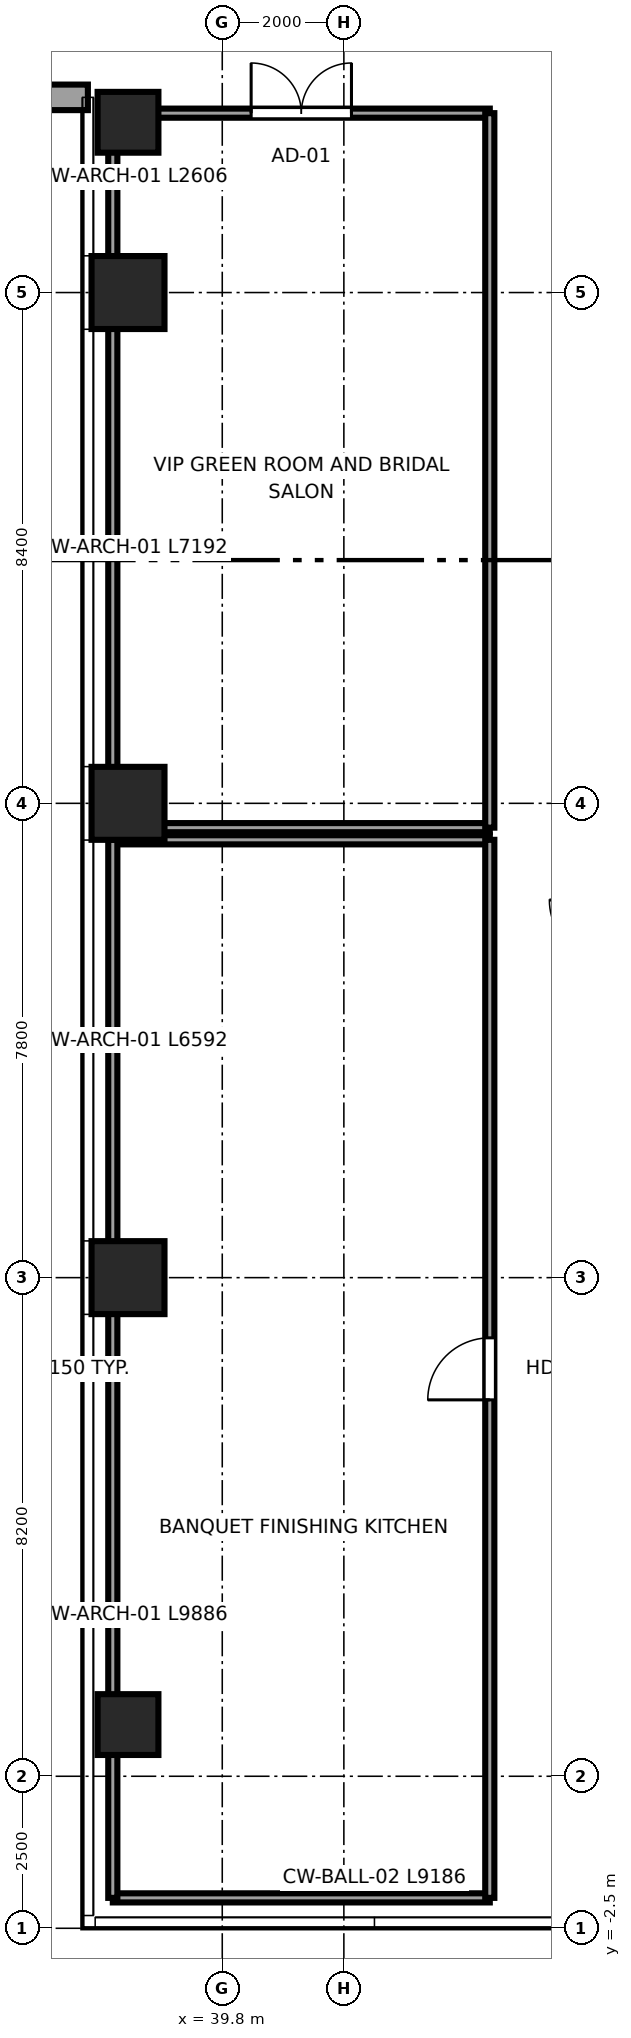
"""IFC4 building model, lengths in metres.
Left out: names, types, materials, properties, quantities, classifications, styles, units other than length and angle.
Written with IfcOpenShell. Run it as: python <this file> out.ifc"""

import sys

from ifc_helpers import new_model, si_unit, direction, frame, frame_2d, origin, origin_2d, place, context, subcontext, project, spatial, rectangle, circle, extrude, source, transform, mapped, element, fill, save


model = new_model("IFC4")
c1 = context("Model", 3, precision=1e-05, world=origin(), true_north=direction((0.0, 1.0)))
c2 = subcontext(c1, "Body", "Model", "MODEL_VIEW")
j1 = project(units=[si_unit("LENGTHUNIT", "METRE"), si_unit("PLANEANGLEUNIT", "RADIAN")], contexts=[c1])
p1 = place(None, origin())
s1 = spatial("IfcSite", under=j1, at=p1, CompositionType="ELEMENT")
p2 = place(p1, origin())
s2 = spatial("IfcBuilding", under=s1, at=p2, CompositionType="ELEMENT")
p3 = place(p2, frame((0.0, 0.0, 16.0)))
s3 = spatial("IfcBuildingStorey", under=s2, at=p3, CompositionType="ELEMENT", Elevation=16.0)
m1 = source(origin(), c2, "Body", "SweptSolid", [
    extrude(circle(Radius=0.5, at=origin_2d()), origin(), (0.0, 0.0, 1.0), 6.4),
])
p4 = place(p3, frame((38.25, 0.85, 0.0), z_axis=(0.0, 0.0, 1.0), x_axis=(1.0, 0.0, 0.0)))
e1 = element("IfcColumn", 1, at=p4, inside=s3, PredefinedType="COLUMN", context=c2, shape_type="MappedRepresentation", body=[
    mapped(m1, transform((0.0, 0.0, 0.0), x_axis=(1.0, 0.0, 0.0), y_axis=(0.0, 1.0, 0.0), z_axis=(0.0, 0.0, 1.0), scale=1.0)),
])
m2 = source(origin(), c2, "Body", "SweptSolid", [
    extrude(rectangle(XDim=1.2, YDim=1.2, at=origin_2d()), origin(), (0.0, 0.0, 1.0), 6.4),
])
for number, where, z_axis, x_axis in (
    (2, (38.25, 8.2, 0.0), (0.0, 0.0, 1.0), (1.0, 0.0, 0.0)),
    (3, (38.25, 16.0, 0.0), (0.0, 0.0, 1.0), (1.0, 0.0, 0.0)),
    (4, (38.25, 24.4, 0.0), (0.0, 0.0, 1.0), (1.0, 0.0, 0.0)),
):
    element("IfcColumn", number, at=place(p3, frame(where, z_axis=z_axis, x_axis=x_axis)), inside=s3, PredefinedType="COLUMN", context=c2, shape_type="MappedRepresentation", body=[
        mapped(m2, transform((0.0, 0.0, 0.0), x_axis=(1.0, 0.0, 0.0), y_axis=(0.0, 1.0, 0.0), z_axis=(0.0, 0.0, 1.0), scale=1.0)),
    ])
p5 = place(p3, frame((38.25, 27.2, 0.0), z_axis=(0.0, 0.0, 1.0), x_axis=(1.0, 0.0, 0.0)))
e5 = element("IfcColumn", 5, at=p5, inside=s3, PredefinedType="COLUMN", context=c2, shape_type="MappedRepresentation", body=[
    mapped(m1, transform((0.0, 0.0, 0.0), x_axis=(1.0, 0.0, 0.0), y_axis=(0.0, 1.0, 0.0), z_axis=(0.0, 0.0, 1.0), scale=1.0)),
])
p6 = place(p3, frame((19.41, 27.61, 0.0), z_axis=(0.0, 0.0, 1.0), x_axis=(1.0, 0.0, 0.0)))
e6 = element("IfcWall", 6, at=p6, inside=s3, PredefinedType="SOLIDWALL", context=c2, shape_type="SweptSolid", body=[
    extrude(rectangle(XDim=18.18, YDim=0.42, at=frame_2d((9.09, 0.0))), origin(), (0.0, 0.0, 1.0), 3.73),
])
p7 = place(p6, frame((1.93, 0.0, 0.65)))
e7 = element("IfcOpeningElement", 7, at=p7, cuts=e6, PredefinedType="OPENING", context=c2, shape_type="SweptSolid", body=[
    extrude(rectangle(XDim=3.0, YDim=2.5, at=frame_2d((1.5, 1.25))), frame((0.0, 0.22, 0.0), z_axis=(0.0, -1.0, 0.0), x_axis=(1.0, 0.0, 0.0)), (0.0, 0.0, 1.0), 0.44),
])
p8 = place(p6, frame((7.59, 0.0, 0.65)))
e8 = element("IfcOpeningElement", 8, at=p8, cuts=e6, PredefinedType="OPENING", context=c2, shape_type="SweptSolid", body=[
    extrude(rectangle(XDim=3.0, YDim=2.5, at=frame_2d((1.5, 1.25))), frame((0.0, 0.22, 0.0), z_axis=(0.0, -1.0, 0.0), x_axis=(1.0, 0.0, 0.0)), (0.0, 0.0, 1.0), 0.44),
])
p9 = place(p6, frame((13.25, 0.0, 0.65)))
e9 = element("IfcOpeningElement", 9, at=p9, cuts=e6, PredefinedType="OPENING", context=c2, shape_type="SweptSolid", body=[
    extrude(rectangle(XDim=3.0, YDim=2.5, at=frame_2d((1.5, 1.25))), frame((0.0, 0.22, 0.0), z_axis=(0.0, -1.0, 0.0), x_axis=(1.0, 0.0, 0.0)), (0.0, 0.0, 1.0), 0.44),
])
p10 = place(p3, frame((38.0, -2.0, 0.0), z_axis=(0.0, 0.0, 1.0), x_axis=(1.0, 0.0, 0.0)))
e10 = element("IfcWall", 10, at=p10, inside=s3, PredefinedType="PARTITIONING", context=c2, shape_type="SweptSolid", body=[
    extrude(rectangle(XDim=6.2, YDim=0.15, at=frame_2d((3.1, 0.0))), origin(), (0.0, 0.0, 1.0), 5.43),
])
p11 = place(p3, frame((38.0, 15.4, 0.0), z_axis=(0.0, 0.0, 1.0), x_axis=(1.0, 0.0, 0.0)))
e11 = element("IfcWall", 11, at=p11, inside=s3, PredefinedType="PARTITIONING", context=c2, shape_type="SweptSolid", body=[
    extrude(rectangle(XDim=6.2, YDim=0.15, at=frame_2d((3.1, 0.0))), origin(), (0.0, 0.0, 1.0), 6.14),
])
p12 = place(p3, frame((38.0, -2.0, 0.0), z_axis=(0.0, 0.0, 1.0), x_axis=(0.0, 1.0, 0.0)))
e12 = element("IfcWall", 12, at=p12, inside=s3, PredefinedType="PARTITIONING", context=c2, shape_type="SweptSolid", body=[
    extrude(rectangle(XDim=17.4, YDim=0.15, at=frame_2d((8.7, 0.0))), origin(), (0.0, 0.0, 1.0), 6.14),
])
p13 = place(p3, frame((44.2, -2.0, 0.0), z_axis=(0.0, 0.0, 1.0), x_axis=(0.0, 1.0, 0.0)))
e13 = element("IfcWall", 13, at=p13, inside=s3, PredefinedType="PARTITIONING", context=c2, shape_type="SweptSolid", body=[
    extrude(rectangle(XDim=17.4, YDim=0.15, at=frame_2d((8.7, 0.0))), origin(), (0.0, 0.0, 1.0), 5.676),
])
p14 = place(p13, frame((8.19, 0.0, 0.0)))
e14 = element("IfcOpeningElement", 14, at=p14, cuts=e13, PredefinedType="OPENING", context=c2, shape_type="SweptSolid", body=[
    extrude(rectangle(XDim=1.02, YDim=2.03, at=frame_2d((0.51, 1.015))), frame((0.0, 0.085, 0.0), z_axis=(0.0, -1.0, 0.0), x_axis=(1.0, 0.0, 0.0)), (0.0, 0.0, 1.0), 0.17),
])
p15 = place(p3, frame((38.0, 15.6, 0.0), z_axis=(0.0, 0.0, 1.0), x_axis=(1.0, 0.0, 0.0)))
e15 = element("IfcWall", 15, at=p15, inside=s3, PredefinedType="PARTITIONING", context=c2, shape_type="SweptSolid", body=[
    extrude(rectangle(XDim=6.2, YDim=0.15, at=frame_2d((3.1, 0.0))), origin(), (0.0, 0.0, 1.0), 6.14),
])
p16 = place(p3, frame((38.0, 27.35, 0.0), z_axis=(0.0, 0.0, 1.0), x_axis=(1.0, 0.0, 0.0)))
e16 = element("IfcWall", 16, at=p16, inside=s3, PredefinedType="PARTITIONING", context=c2, shape_type="SweptSolid", body=[
    extrude(rectangle(XDim=6.2, YDim=0.15, at=frame_2d((3.1, 0.0))), origin(), (0.0, 0.0, 1.0), 3.73),
])
p17 = place(p16, frame((2.275, 0.0, 0.0)))
e17 = element("IfcOpeningElement", 17, at=p17, cuts=e16, PredefinedType="OPENING", context=c2, shape_type="SweptSolid", body=[
    extrude(rectangle(XDim=1.65, YDim=2.15, at=frame_2d((0.825, 1.075))), frame((0.0, 0.085, 0.0), z_axis=(0.0, -1.0, 0.0), x_axis=(1.0, 0.0, 0.0)), (0.0, 0.0, 1.0), 0.17),
])
p18 = place(p3, frame((38.0, 15.6, 0.0), z_axis=(0.0, 0.0, 1.0), x_axis=(0.0, 1.0, 0.0)))
e18 = element("IfcWall", 18, at=p18, inside=s3, PredefinedType="PARTITIONING", context=c2, shape_type="SweptSolid", body=[
    extrude(rectangle(XDim=11.75, YDim=0.15, at=frame_2d((5.875, 0.0))), origin(), (0.0, 0.0, 1.0), 6.14),
])
p19 = place(p3, frame((44.2, 15.6, 0.0), z_axis=(0.0, 0.0, 1.0), x_axis=(0.0, 1.0, 0.0)))
e19 = element("IfcWall", 19, at=p19, inside=s3, PredefinedType="PARTITIONING", context=c2, shape_type="SweptSolid", body=[
    extrude(rectangle(XDim=11.75, YDim=0.15, at=frame_2d((5.875, 0.0))), origin(), (0.0, 0.0, 1.0), 5.676),
])
m3 = source(origin(), c2, "Body", "SweptSolid", [
    extrude(rectangle(XDim=1.02, YDim=2.03, at=frame_2d((0.51, 1.015))), frame((0.0, 0.025, 0.0), z_axis=(0.0, -1.0, 0.0), x_axis=(1.0, 0.0, 0.0)), (0.0, 0.0, 1.0), 0.05),
])
p20 = place(p14, origin())
e20 = element("IfcDoor", 20, at=p20, inside=s3, OperationType="SINGLE_SWING_LEFT", PredefinedType="DOOR", context=c2, shape_type="MappedRepresentation", body=[
    mapped(m3, transform((0.0, 0.0, 0.0), x_axis=(1.0, 0.0, 0.0), y_axis=(0.0, 1.0, 0.0), z_axis=(0.0, 0.0, 1.0), scale=1.0)),
])
fill(e14, e20)
m4 = source(origin(), c2, "Body", "SweptSolid", [
    extrude(rectangle(XDim=1.65, YDim=2.15, at=frame_2d((0.825, 1.075))), frame((0.0, 0.025, 0.0), z_axis=(0.0, -1.0, 0.0), x_axis=(1.0, 0.0, 0.0)), (0.0, 0.0, 1.0), 0.05),
])
p21 = place(p17, origin())
e21 = element("IfcDoor", 21, at=p21, inside=s3, OperationType="DOUBLE_DOOR_SINGLE_SWING", PredefinedType="DOOR", context=c2, shape_type="MappedRepresentation", body=[
    mapped(m4, transform((0.0, 0.0, 0.0), x_axis=(1.0, 0.0, 0.0), y_axis=(0.0, 1.0, 0.0), z_axis=(0.0, 0.0, 1.0), scale=1.0)),
])
fill(e17, e21)
save(model, sys.argv[1])
